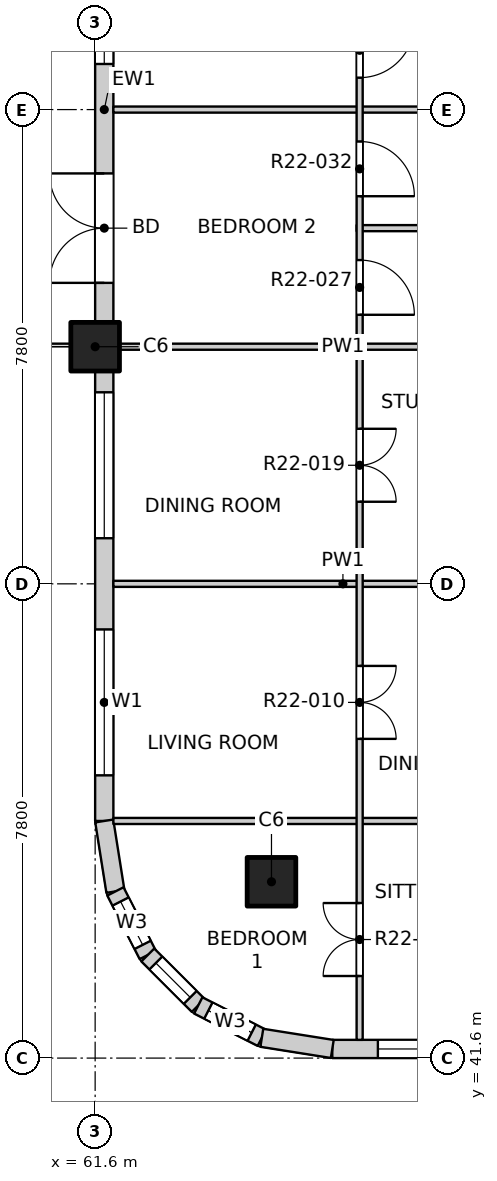
"""IFC4 building model, lengths in metres.
Left out: names, types, materials, properties, quantities, classifications, styles, units other than length and angle.
Written with IfcOpenShell. Run it as: python <this file> out.ifc"""

import sys

from ifc_helpers import new_model, si_unit, direction, frame, frame_2d, origin, origin_2d, place, context, subcontext, project, spatial, rectangle, extrude, element, fill, save


model = new_model("IFC4")
c1 = context("Model", 3, precision=1e-05, world=origin(), true_north=direction((0.0, 1.0)))
c2 = subcontext(c1, "Body", "Model", "MODEL_VIEW")
j1 = project(units=[si_unit("LENGTHUNIT", "METRE"), si_unit("PLANEANGLEUNIT", "RADIAN")], contexts=[c1])
p1 = place(None, origin())
s1 = spatial("IfcSite", under=j1, at=p1, CompositionType="ELEMENT")
p2 = place(p1, origin())
s2 = spatial("IfcBuilding", under=s1, at=p2, CompositionType="ELEMENT")
p3 = place(p2, frame((0.0, 0.0, 231.3)))
s3 = spatial("IfcBuildingStorey", under=s2, at=p3, CompositionType="ELEMENT", Elevation=231.3)
for number, where, z_axis, x_axis in (
    (1, (64.5, 44.5, -0.25), (0.0, 0.0, 1.0), (1.0, 0.0, 0.0)),
    (2, (61.6, 53.3, -0.25), (0.0, 0.0, 1.0), (1.0, 0.0, 0.0)),
):
    element("IfcColumn", number, at=place(p3, frame(where, z_axis=z_axis, x_axis=x_axis)), inside=s3, PredefinedType="COLUMN", context=c2, shape_type="SweptSolid", body=[
        extrude(rectangle(XDim=0.8, YDim=0.8, at=origin_2d()), origin(), (0.0, 0.0, 1.0), 3.4),
    ])
p4 = place(p3, frame((65.5, 41.75, 0.0), z_axis=(0.0, 0.0, 1.0), x_axis=(1.0, 0.0, 0.0)))
e3 = element("IfcWall", 3, at=p4, inside=s3, PredefinedType="SOLIDWALL", context=c2, shape_type="SweptSolid", body=[
    extrude(rectangle(XDim=7.4, YDim=0.3, at=frame_2d((3.7, 0.0))), origin(), (0.0, 0.0, 1.0), 2.7),
])
p5 = place(p4, frame((0.75, 0.0, 0.9)))
e4 = element("IfcOpeningElement", 4, at=p5, cuts=e3, PredefinedType="OPENING", context=c2, shape_type="SweptSolid", body=[
    extrude(rectangle(XDim=2.4, YDim=1.8, at=frame_2d((1.2, 0.9))), frame((0.0, 0.16, 0.0), z_axis=(0.0, -1.0, 0.0), x_axis=(1.0, 0.0, 0.0)), (0.0, 0.0, 1.0), 0.32),
])
p6 = place(p4, frame((4.65, 0.0, 0.9)))
e5 = element("IfcOpeningElement", 5, at=p6, cuts=e3, PredefinedType="OPENING", context=c2, shape_type="SweptSolid", body=[
    extrude(rectangle(XDim=2.4, YDim=1.8, at=frame_2d((1.2, 0.9))), frame((0.0, 0.16, 0.0), z_axis=(0.0, -1.0, 0.0), x_axis=(1.0, 0.0, 0.0)), (0.0, 0.0, 1.0), 0.32),
])
p7 = place(p3, frame((61.75, 45.5, 0.0), z_axis=(0.0, 0.0, 1.0), x_axis=(0.0, 1.0, 0.0)))
e6 = element("IfcWall", 6, at=p7, inside=s3, PredefinedType="SOLIDWALL", context=c2, shape_type="SweptSolid", body=[
    extrude(rectangle(XDim=7.4, YDim=0.3, at=frame_2d((3.7, 0.0))), origin(), (0.0, 0.0, 1.0), 2.7),
])
p8 = place(p7, frame((0.75, 0.0, 0.9)))
e7 = element("IfcOpeningElement", 7, at=p8, cuts=e6, PredefinedType="OPENING", context=c2, shape_type="SweptSolid", body=[
    extrude(rectangle(XDim=2.4, YDim=1.8, at=frame_2d((1.2, 0.9))), frame((0.0, 0.16, 0.0), z_axis=(0.0, -1.0, 0.0), x_axis=(1.0, 0.0, 0.0)), (0.0, 0.0, 1.0), 0.32),
])
p9 = place(p7, frame((4.65, 0.0, 0.9)))
e8 = element("IfcOpeningElement", 8, at=p9, cuts=e6, PredefinedType="OPENING", context=c2, shape_type="SweptSolid", body=[
    extrude(rectangle(XDim=2.4, YDim=1.8, at=frame_2d((1.2, 0.9))), frame((0.0, 0.16, 0.0), z_axis=(0.0, -1.0, 0.0), x_axis=(1.0, 0.0, 0.0)), (0.0, 0.0, 1.0), 0.32),
])
p10 = place(p3, frame((61.75, 53.7, 0.0), z_axis=(0.0, 0.0, 1.0), x_axis=(0.0, 1.0, 0.0)))
e9 = element("IfcWall", 9, at=p10, inside=s3, PredefinedType="SOLIDWALL", context=c2, shape_type="SweptSolid", body=[
    extrude(rectangle(XDim=7.0, YDim=0.3, at=frame_2d((3.5, 0.0))), origin(), (0.0, 0.0, 1.0), 2.7),
])
p11 = place(p10, frame((0.65, 0.0, 0.0)))
e10 = element("IfcOpeningElement", 10, at=p11, cuts=e9, PredefinedType="OPENING", context=c2, shape_type="SweptSolid", body=[
    extrude(rectangle(XDim=1.8, YDim=2.4, at=frame_2d((0.9, 1.2))), frame((0.0, 0.16, 0.0), z_axis=(0.0, -1.0, 0.0), x_axis=(1.0, 0.0, 0.0)), (0.0, 0.0, 1.0), 0.32),
])
p12 = place(p10, frame((4.25, 0.0, 0.9)))
e11 = element("IfcOpeningElement", 11, at=p12, cuts=e9, PredefinedType="OPENING", context=c2, shape_type="SweptSolid", body=[
    extrude(rectangle(XDim=2.4, YDim=1.8, at=frame_2d((1.2, 0.9))), frame((0.0, 0.16, 0.0), z_axis=(0.0, -1.0, 0.0), x_axis=(1.0, 0.0, 0.0)), (0.0, 0.0, 1.0), 0.32),
])
p13 = place(p3, frame((61.75, 45.5, 0.0), z_axis=(0.0, 0.0, 1.0), x_axis=(0.156496880861, -0.987678452879, 0.0)))
e12 = element("IfcWall", 12, at=p13, inside=s3, PredefinedType="SOLIDWALL", context=c2, shape_type="SweptSolid", body=[
    extrude(rectangle(XDim=1.173, YDim=0.3, at=frame_2d((0.586, 0.0))), origin(), (0.0, 0.0, 1.0), 2.7),
])
p14 = place(p3, frame((61.934, 44.341, 0.0), z_axis=(0.0, 0.0, 1.0), x_axis=(0.454025524128, -0.890988677504, 0.0)))
e13 = element("IfcWall", 13, at=p14, inside=s3, PredefinedType="SOLIDWALL", context=c2, shape_type="SweptSolid", body=[
    extrude(rectangle(XDim=1.173, YDim=0.3, at=frame_2d((0.587, 0.0))), origin(), (0.0, 0.0, 1.0), 2.7),
])
p15 = place(p14, frame((0.187, 0.0, 0.9)))
e14 = element("IfcOpeningElement", 14, at=p15, cuts=e13, PredefinedType="OPENING", context=c2, shape_type="SweptSolid", body=[
    extrude(rectangle(XDim=0.8, YDim=1.2, at=frame_2d((0.4, 0.6))), frame((0.0, 0.16, 0.0), z_axis=(0.0, -1.0, 0.0), x_axis=(1.0, 0.0, 0.0)), (0.0, 0.0, 1.0), 0.32),
])
p16 = place(p3, frame((62.466, 43.296, 0.0), z_axis=(0.0, 0.0, 1.0), x_axis=(0.707106781187, -0.707106781187, 0.0)))
e15 = element("IfcWall", 15, at=p16, inside=s3, PredefinedType="SOLIDWALL", context=c2, shape_type="SweptSolid", body=[
    extrude(rectangle(XDim=1.173, YDim=0.3, at=frame_2d((0.586, 0.0))), origin(), (0.0, 0.0, 1.0), 2.7),
])
p17 = place(p16, frame((0.187, 0.0, 0.9)))
e16 = element("IfcOpeningElement", 16, at=p17, cuts=e15, PredefinedType="OPENING", context=c2, shape_type="SweptSolid", body=[
    extrude(rectangle(XDim=0.8, YDim=1.2, at=frame_2d((0.4, 0.6))), frame((0.0, 0.16, 0.0), z_axis=(0.0, -1.0, 0.0), x_axis=(1.0, 0.0, 0.0)), (0.0, 0.0, 1.0), 0.32),
])
p18 = place(p3, frame((63.296, 42.466, 0.0), z_axis=(0.0, 0.0, 1.0), x_axis=(0.890988677504, -0.454025524128, 0.0)))
e17 = element("IfcWall", 17, at=p18, inside=s3, PredefinedType="SOLIDWALL", context=c2, shape_type="SweptSolid", body=[
    extrude(rectangle(XDim=1.173, YDim=0.3, at=frame_2d((0.587, 0.0))), origin(), (0.0, 0.0, 1.0), 2.7),
])
p19 = place(p18, frame((0.187, 0.0, 0.9)))
e18 = element("IfcOpeningElement", 18, at=p19, cuts=e17, PredefinedType="OPENING", context=c2, shape_type="SweptSolid", body=[
    extrude(rectangle(XDim=0.8, YDim=1.2, at=frame_2d((0.4, 0.6))), frame((0.0, 0.16, 0.0), z_axis=(0.0, -1.0, 0.0), x_axis=(1.0, 0.0, 0.0)), (0.0, 0.0, 1.0), 0.32),
])
p20 = place(p3, frame((64.341, 41.934, 0.0), z_axis=(0.0, 0.0, 1.0), x_axis=(0.987678452879, -0.156496880861, 0.0)))
e19 = element("IfcWall", 19, at=p20, inside=s3, PredefinedType="SOLIDWALL", context=c2, shape_type="SweptSolid", body=[
    extrude(rectangle(XDim=1.173, YDim=0.3, at=frame_2d((0.586, 0.0))), origin(), (0.0, 0.0, 1.0), 2.7),
])
p21 = place(p3, frame((61.9, 45.5, 0.0), z_axis=(0.0, 0.0, 1.0), x_axis=(1.0, 0.0, 0.0)))
e20 = element("IfcWall", 20, at=p21, inside=s3, PredefinedType="PARTITIONING", context=c2, shape_type="SweptSolid", body=[
    extrude(rectangle(XDim=11.475, YDim=0.1, at=frame_2d((5.737, 0.0))), origin(), (0.0, 0.0, 1.0), 3.15),
])
p22 = place(p21, frame((7.965, 0.0, 0.0)))
e21 = element("IfcOpeningElement", 21, at=p22, cuts=e20, PredefinedType="OPENING", context=c2, shape_type="SweptSolid", body=[
    extrude(rectangle(XDim=0.9, YDim=2.1, at=frame_2d((0.45, 1.05))), frame((0.0, 0.06, 0.0), z_axis=(0.0, -1.0, 0.0), x_axis=(1.0, 0.0, 0.0)), (0.0, 0.0, 1.0), 0.12),
])
for number, where, z_axis, x_axis in (
    (22, (61.9, 49.4, 0.0), (0.0, 0.0, 1.0), (1.0, 0.0, 0.0)),
    (23, (61.9, 53.3, 0.0), (0.0, 0.0, 1.0), (1.0, 0.0, 0.0)),
):
    element("IfcWall", number, at=place(p3, frame(where, z_axis=z_axis, x_axis=x_axis)), inside=s3, PredefinedType="PARTITIONING", context=c2, shape_type="SweptSolid", body=[
        extrude(rectangle(XDim=7.55, YDim=0.1, at=frame_2d((3.775, 0.0))), origin(), (0.0, 0.0, 1.0), 3.15),
    ])
p23 = place(p3, frame((65.9, 55.25, 0.0), z_axis=(0.0, 0.0, 1.0), x_axis=(1.0, 0.0, 0.0)))
e24 = element("IfcWall", 24, at=p23, inside=s3, PredefinedType="PARTITIONING", context=c2, shape_type="SweptSolid", body=[
    extrude(rectangle(XDim=3.55, YDim=0.1, at=frame_2d((1.775, 0.0))), origin(), (0.0, 0.0, 1.0), 3.15),
])
p24 = place(p3, frame((61.9, 57.2, 0.0), z_axis=(0.0, 0.0, 1.0), x_axis=(1.0, 0.0, 0.0)))
e25 = element("IfcWall", 25, at=p24, inside=s3, PredefinedType="PARTITIONING", context=c2, shape_type="SweptSolid", body=[
    extrude(rectangle(XDim=7.55, YDim=0.1, at=frame_2d((3.775, 0.0))), origin(), (0.0, 0.0, 1.0), 3.15),
])
p25 = place(p3, frame((65.95, 41.9, 0.0), z_axis=(0.0, 0.0, 1.0), x_axis=(0.0, 1.0, 0.0)))
e26 = element("IfcWall", 26, at=p25, inside=s3, PredefinedType="PARTITIONING", context=c2, shape_type="SweptSolid", body=[
    extrude(rectangle(XDim=19.1, YDim=0.1, at=frame_2d((9.55, 0.0))), origin(), (0.0, 0.0, 1.0), 3.15),
])
p26 = place(p25, frame((1.05, 0.0, 0.0)))
e27 = element("IfcOpeningElement", 27, at=p26, cuts=e26, PredefinedType="OPENING", context=c2, shape_type="SweptSolid", body=[
    extrude(rectangle(XDim=1.2, YDim=2.1, at=frame_2d((0.6, 1.05))), frame((0.0, 0.06, 0.0), z_axis=(0.0, -1.0, 0.0), x_axis=(1.0, 0.0, 0.0)), (0.0, 0.0, 1.0), 0.12),
])
p27 = place(p25, frame((4.95, 0.0, 0.0)))
e28 = element("IfcOpeningElement", 28, at=p27, cuts=e26, PredefinedType="OPENING", context=c2, shape_type="SweptSolid", body=[
    extrude(rectangle(XDim=1.2, YDim=2.1, at=frame_2d((0.6, 1.05))), frame((0.0, 0.06, 0.0), z_axis=(0.0, -1.0, 0.0), x_axis=(1.0, 0.0, 0.0)), (0.0, 0.0, 1.0), 0.12),
])
p28 = place(p25, frame((8.85, 0.0, 0.0)))
e29 = element("IfcOpeningElement", 29, at=p28, cuts=e26, PredefinedType="OPENING", context=c2, shape_type="SweptSolid", body=[
    extrude(rectangle(XDim=1.2, YDim=2.1, at=frame_2d((0.6, 1.05))), frame((0.0, 0.06, 0.0), z_axis=(0.0, -1.0, 0.0), x_axis=(1.0, 0.0, 0.0)), (0.0, 0.0, 1.0), 0.12),
])
p29 = place(p25, frame((11.925, 0.0, 0.0)))
e30 = element("IfcOpeningElement", 30, at=p29, cuts=e26, PredefinedType="OPENING", context=c2, shape_type="SweptSolid", body=[
    extrude(rectangle(XDim=0.9, YDim=2.1, at=frame_2d((0.45, 1.05))), frame((0.0, 0.06, 0.0), z_axis=(0.0, -1.0, 0.0), x_axis=(1.0, 0.0, 0.0)), (0.0, 0.0, 1.0), 0.12),
])
p30 = place(p25, frame((13.875, 0.0, 0.0)))
e31 = element("IfcOpeningElement", 31, at=p30, cuts=e26, PredefinedType="OPENING", context=c2, shape_type="SweptSolid", body=[
    extrude(rectangle(XDim=0.9, YDim=2.1, at=frame_2d((0.45, 1.05))), frame((0.0, 0.06, 0.0), z_axis=(0.0, -1.0, 0.0), x_axis=(1.0, 0.0, 0.0)), (0.0, 0.0, 1.0), 0.12),
])
p31 = place(p25, frame((15.825, 0.0, 0.0)))
e32 = element("IfcOpeningElement", 32, at=p31, cuts=e26, PredefinedType="OPENING", context=c2, shape_type="SweptSolid", body=[
    extrude(rectangle(XDim=0.9, YDim=2.1, at=frame_2d((0.45, 1.05))), frame((0.0, 0.06, 0.0), z_axis=(0.0, -1.0, 0.0), x_axis=(1.0, 0.0, 0.0)), (0.0, 0.0, 1.0), 0.12),
])
p32 = place(p25, frame((17.775, 0.0, 0.0)))
e33 = element("IfcOpeningElement", 33, at=p32, cuts=e26, PredefinedType="OPENING", context=c2, shape_type="SweptSolid", body=[
    extrude(rectangle(XDim=0.9, YDim=2.1, at=frame_2d((0.45, 1.05))), frame((0.0, 0.06, 0.0), z_axis=(0.0, -1.0, 0.0), x_axis=(1.0, 0.0, 0.0)), (0.0, 0.0, 1.0), 0.12),
])
p33 = place(p5, origin())
e34 = element("IfcWindow", 34, at=p33, inside=s3, PartitioningType="DOUBLE_PANEL_VERTICAL", PredefinedType="WINDOW", context=c2, shape_type="SweptSolid", body=[
    extrude(rectangle(XDim=2.4, YDim=1.8, at=frame_2d((1.2, 0.9))), frame((0.0, 0.03, 0.0), z_axis=(0.0, -1.0, 0.0), x_axis=(1.0, 0.0, 0.0)), (0.0, 0.0, 1.0), 0.06),
])
fill(e4, e34)
p34 = place(p8, origin())
e35 = element("IfcWindow", 35, at=p34, inside=s3, PartitioningType="DOUBLE_PANEL_VERTICAL", PredefinedType="WINDOW", context=c2, shape_type="SweptSolid", body=[
    extrude(rectangle(XDim=2.4, YDim=1.8, at=frame_2d((1.2, 0.9))), frame((0.0, 0.03, 0.0), z_axis=(0.0, -1.0, 0.0), x_axis=(1.0, 0.0, 0.0)), (0.0, 0.0, 1.0), 0.06),
])
fill(e7, e35)
p35 = place(p9, origin())
e36 = element("IfcWindow", 36, at=p35, inside=s3, PartitioningType="DOUBLE_PANEL_VERTICAL", PredefinedType="WINDOW", context=c2, shape_type="SweptSolid", body=[
    extrude(rectangle(XDim=2.4, YDim=1.8, at=frame_2d((1.2, 0.9))), frame((0.0, 0.03, 0.0), z_axis=(0.0, -1.0, 0.0), x_axis=(1.0, 0.0, 0.0)), (0.0, 0.0, 1.0), 0.06),
])
fill(e8, e36)
p36 = place(p11, origin())
e37 = element("IfcDoor", 37, at=p36, inside=s3, OperationType="DOUBLE_DOOR_SINGLE_SWING", PredefinedType="DOOR", context=c2, shape_type="SweptSolid", body=[
    extrude(rectangle(XDim=1.8, YDim=2.4, at=frame_2d((0.9, 1.2))), frame((0.0, 0.025, 0.0), z_axis=(0.0, -1.0, 0.0), x_axis=(1.0, 0.0, 0.0)), (0.0, 0.0, 1.0), 0.05),
])
fill(e10, e37)
p37 = place(p12, origin())
e38 = element("IfcWindow", 38, at=p37, inside=s3, PartitioningType="DOUBLE_PANEL_VERTICAL", PredefinedType="WINDOW", context=c2, shape_type="SweptSolid", body=[
    extrude(rectangle(XDim=2.4, YDim=1.8, at=frame_2d((1.2, 0.9))), frame((0.0, 0.03, 0.0), z_axis=(0.0, -1.0, 0.0), x_axis=(1.0, 0.0, 0.0)), (0.0, 0.0, 1.0), 0.06),
])
fill(e11, e38)
p38 = place(p15, origin())
e39 = element("IfcWindow", 39, at=p38, inside=s3, PartitioningType="SINGLE_PANEL", PredefinedType="WINDOW", context=c2, shape_type="SweptSolid", body=[
    extrude(rectangle(XDim=0.8, YDim=1.2, at=frame_2d((0.4, 0.6))), frame((0.0, 0.03, 0.0), z_axis=(0.0, -1.0, 0.0), x_axis=(1.0, 0.0, 0.0)), (0.0, 0.0, 1.0), 0.06),
])
fill(e14, e39)
p39 = place(p17, origin())
e40 = element("IfcWindow", 40, at=p39, inside=s3, PartitioningType="SINGLE_PANEL", PredefinedType="WINDOW", context=c2, shape_type="SweptSolid", body=[
    extrude(rectangle(XDim=0.8, YDim=1.2, at=frame_2d((0.4, 0.6))), frame((0.0, 0.03, 0.0), z_axis=(0.0, -1.0, 0.0), x_axis=(1.0, 0.0, 0.0)), (0.0, 0.0, 1.0), 0.06),
])
fill(e16, e40)
p40 = place(p19, origin())
e41 = element("IfcWindow", 41, at=p40, inside=s3, PartitioningType="SINGLE_PANEL", PredefinedType="WINDOW", context=c2, shape_type="SweptSolid", body=[
    extrude(rectangle(XDim=0.8, YDim=1.2, at=frame_2d((0.4, 0.6))), frame((0.0, 0.03, 0.0), z_axis=(0.0, -1.0, 0.0), x_axis=(1.0, 0.0, 0.0)), (0.0, 0.0, 1.0), 0.06),
])
fill(e18, e41)
p41 = place(p26, origin())
e42 = element("IfcDoor", 42, at=p41, inside=s3, OperationType="DOUBLE_DOOR_SINGLE_SWING", PredefinedType="DOOR", context=c2, shape_type="SweptSolid", body=[
    extrude(rectangle(XDim=1.2, YDim=2.1, at=frame_2d((0.6, 1.05))), frame((0.0, 0.025, 0.0), z_axis=(0.0, -1.0, 0.0), x_axis=(1.0, 0.0, 0.0)), (0.0, 0.0, 1.0), 0.05),
])
fill(e27, e42)
p42 = place(p27, origin())
e43 = element("IfcDoor", 43, at=p42, inside=s3, OperationType="DOUBLE_DOOR_SINGLE_SWING", PredefinedType="DOOR", context=c2, shape_type="SweptSolid", body=[
    extrude(rectangle(XDim=1.2, YDim=2.1, at=frame_2d((0.6, 1.05))), frame((0.0, 0.025, 0.0), z_axis=(0.0, -1.0, 0.0), x_axis=(1.0, 0.0, 0.0)), (0.0, 0.0, 1.0), 0.05),
])
fill(e28, e43)
p43 = place(p28, origin())
e44 = element("IfcDoor", 44, at=p43, inside=s3, OperationType="DOUBLE_DOOR_SINGLE_SWING", PredefinedType="DOOR", context=c2, shape_type="SweptSolid", body=[
    extrude(rectangle(XDim=1.2, YDim=2.1, at=frame_2d((0.6, 1.05))), frame((0.0, 0.025, 0.0), z_axis=(0.0, -1.0, 0.0), x_axis=(1.0, 0.0, 0.0)), (0.0, 0.0, 1.0), 0.05),
])
fill(e29, e44)
p44 = place(p29, origin())
e45 = element("IfcDoor", 45, at=p44, inside=s3, OperationType="SINGLE_SWING_RIGHT", PredefinedType="DOOR", context=c2, shape_type="SweptSolid", body=[
    extrude(rectangle(XDim=0.9, YDim=2.1, at=frame_2d((0.45, 1.05))), frame((0.0, 0.025, 0.0), z_axis=(0.0, -1.0, 0.0), x_axis=(1.0, 0.0, 0.0)), (0.0, 0.0, 1.0), 0.05),
])
fill(e30, e45)
p45 = place(p30, origin())
e46 = element("IfcDoor", 46, at=p45, inside=s3, OperationType="SINGLE_SWING_RIGHT", PredefinedType="DOOR", context=c2, shape_type="SweptSolid", body=[
    extrude(rectangle(XDim=0.9, YDim=2.1, at=frame_2d((0.45, 1.05))), frame((0.0, 0.025, 0.0), z_axis=(0.0, -1.0, 0.0), x_axis=(1.0, 0.0, 0.0)), (0.0, 0.0, 1.0), 0.05),
])
fill(e31, e46)
p46 = place(p31, origin())
e47 = element("IfcDoor", 47, at=p46, inside=s3, OperationType="SINGLE_SWING_LEFT", PredefinedType="DOOR", context=c2, shape_type="SweptSolid", body=[
    extrude(rectangle(XDim=0.9, YDim=2.1, at=frame_2d((0.45, 1.05))), frame((0.0, 0.025, 0.0), z_axis=(0.0, -1.0, 0.0), x_axis=(1.0, 0.0, 0.0)), (0.0, 0.0, 1.0), 0.05),
])
fill(e32, e47)
save(model, sys.argv[1])
